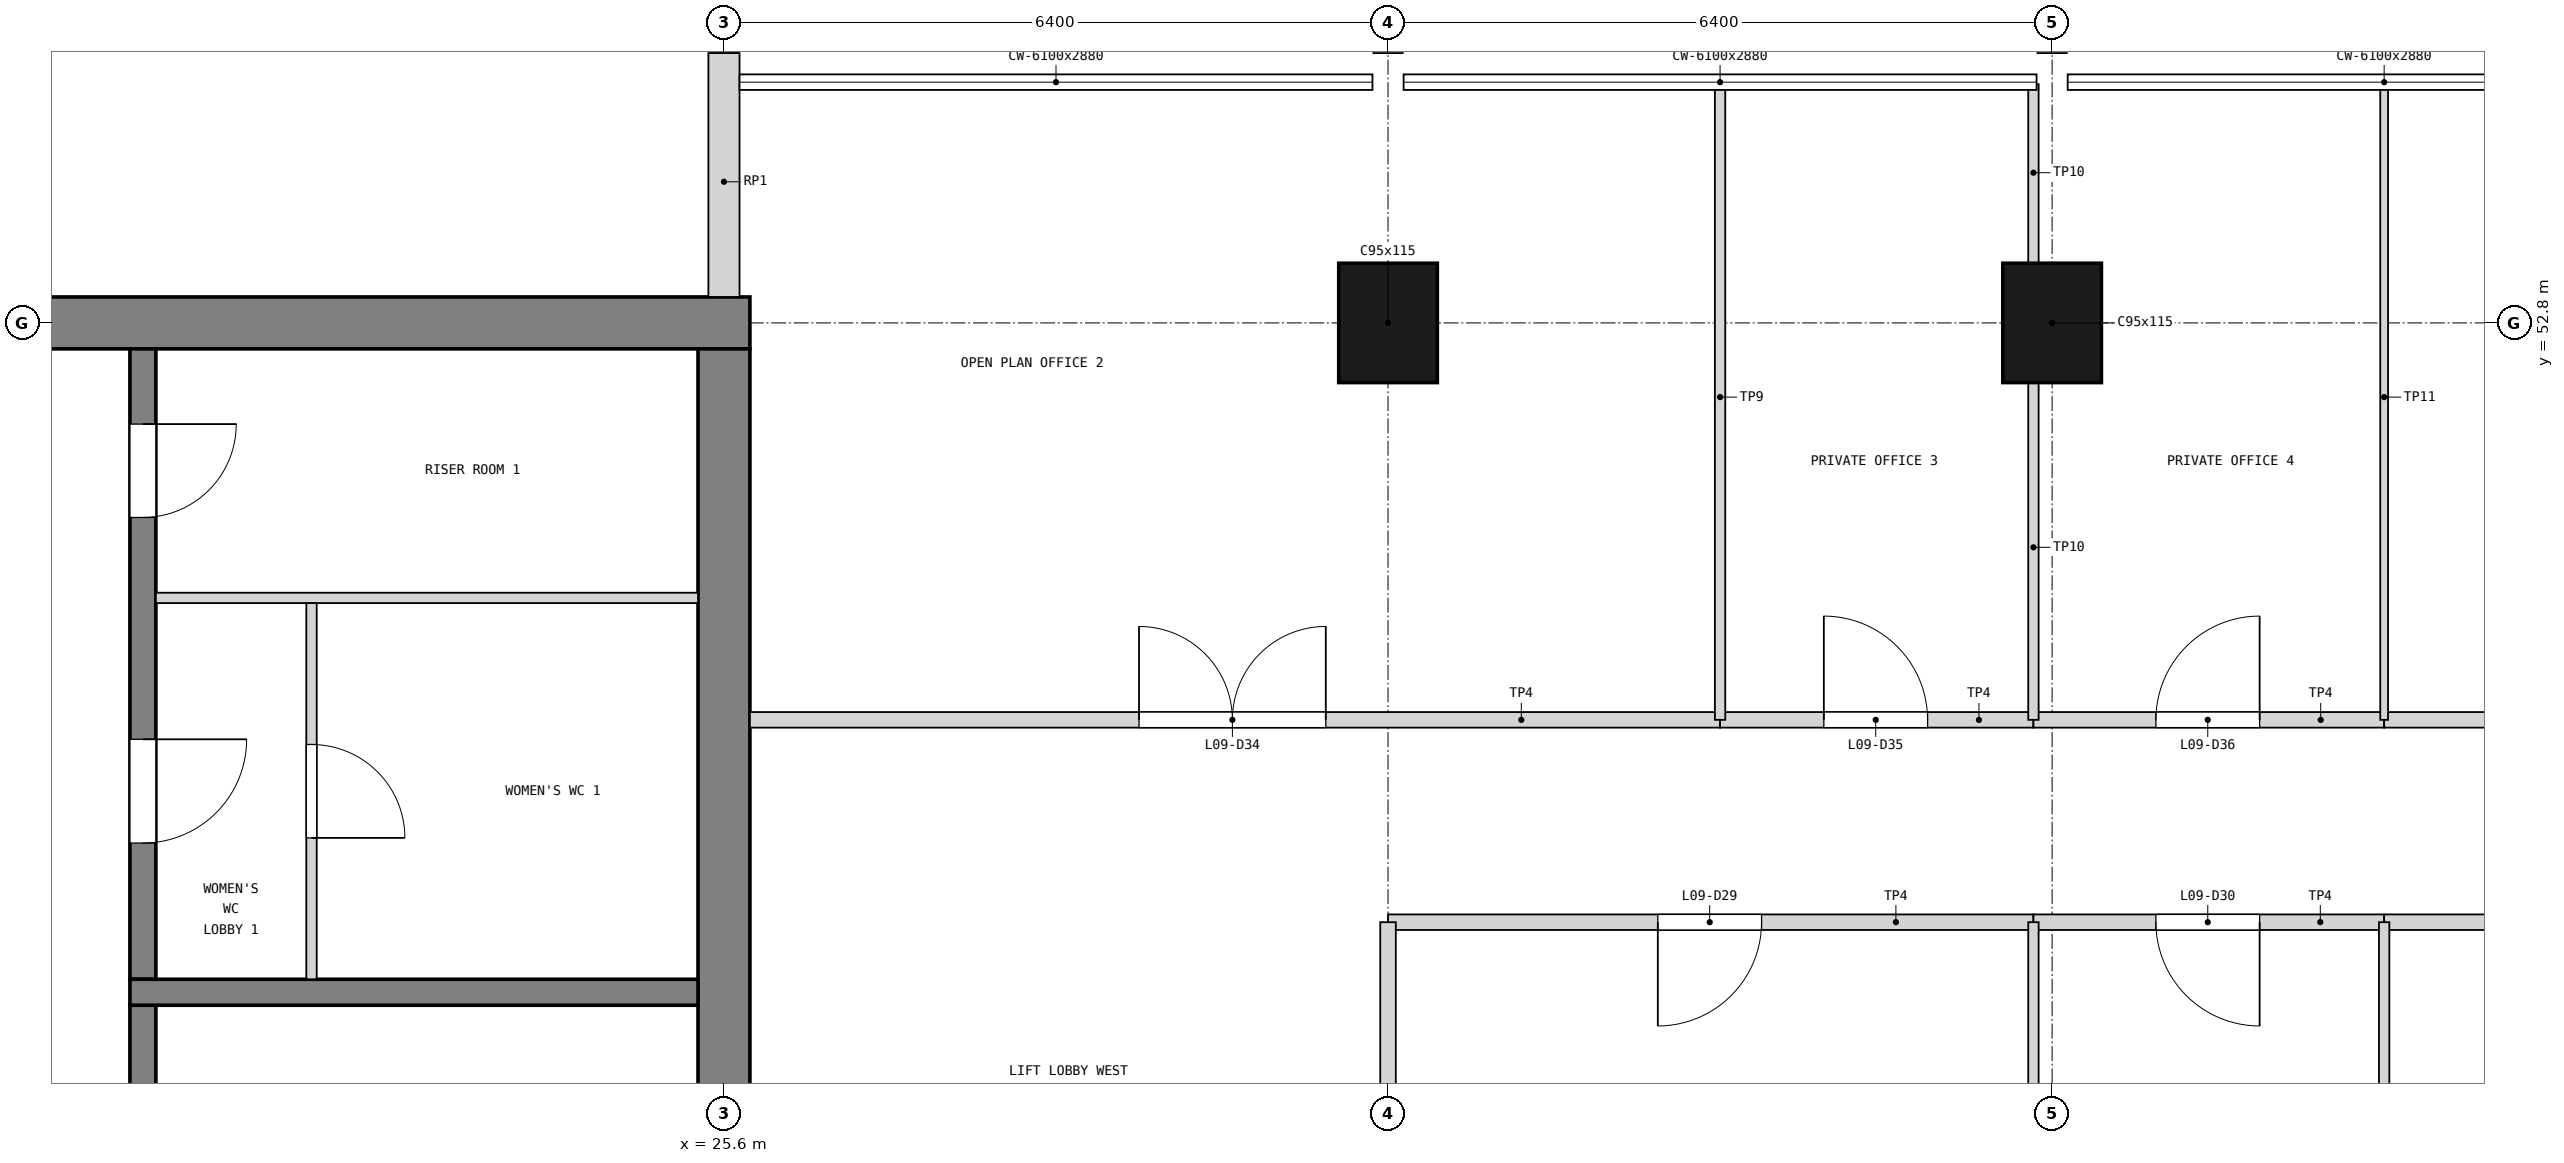
"""IFC4 building model, lengths in metres.
Left out: names, types, materials, properties, quantities, classifications, styles, units other than length and angle.
Written with IfcOpenShell. Run it as: python <this file> out.ifc"""

import sys

from ifc_helpers import new_model, si_unit, direction, frame, frame_2d, origin, origin_2d, place, context, subcontext, project, spatial, rectangle, extrude, element, fill, save


model = new_model("IFC4")
c1 = context("Model", 3, precision=1e-05, world=origin(), true_north=direction((0.0, 1.0)))
c2 = subcontext(c1, "Body", "Model", "MODEL_VIEW")
j1 = project(units=[si_unit("LENGTHUNIT", "METRE"), si_unit("PLANEANGLEUNIT", "RADIAN")], contexts=[c1])
p1 = place(None, origin())
s1 = spatial("IfcSite", under=j1, at=p1, CompositionType="ELEMENT")
p2 = place(p1, origin())
s2 = spatial("IfcBuilding", under=s1, at=p2, CompositionType="ELEMENT")
p3 = place(p2, frame((0.0, 0.0, 36.6)))
s3 = spatial("IfcBuildingStorey", under=s2, at=p3, CompositionType="ELEMENT", Elevation=36.6)
p4 = place(p3, frame((12.55, 52.8, 0.0), z_axis=(0.0, 0.0, 1.0), x_axis=(1.0, 0.0, 0.0)))
e1 = element("IfcWall", 1, at=p4, inside=s3, PredefinedType="SHEAR", context=c2, shape_type="SweptSolid", body=[
    extrude(rectangle(XDim=13.3, YDim=0.5, at=frame_2d((6.65, 0.0))), origin(), (0.0, 0.0, 1.0), 3.9),
])
p5 = place(p4, frame((1.85, 0.0, 1.0)))
e2 = element("IfcOpeningElement", 2, at=p5, cuts=e1, PredefinedType="OPENING", context=c2, shape_type="SweptSolid", body=[
    extrude(rectangle(XDim=0.4, YDim=2.0, at=frame_2d((0.2, 1.0))), frame((0.0, 0.26, 0.0), z_axis=(0.0, -1.0, 0.0), x_axis=(1.0, 0.0, 0.0)), (0.0, 0.0, 1.0), 0.52),
])
p6 = place(p3, frame((25.6, 33.85, 0.0), z_axis=(0.0, 0.0, 1.0), x_axis=(0.0, 1.0, 0.0)))
e3 = element("IfcWall", 3, at=p6, inside=s3, PredefinedType="SHEAR", context=c2, shape_type="SweptSolid", body=[
    extrude(rectangle(XDim=18.7, YDim=0.5, at=frame_2d((9.35, 0.0))), origin(), (0.0, 0.0, 1.0), 3.9),
])
p7 = place(p6, frame((8.35, 0.0, 0.0)))
e4 = element("IfcOpeningElement", 4, at=p7, cuts=e3, PredefinedType="OPENING", context=c2, shape_type="SweptSolid", body=[
    extrude(rectangle(XDim=2.0, YDim=2.1, at=frame_2d((1.0, 1.05))), frame((0.0, 0.26, 0.0), z_axis=(0.0, -1.0, 0.0), x_axis=(1.0, 0.0, 0.0)), (0.0, 0.0, 1.0), 0.52),
])
for number, where, z_axis, x_axis in (
    (5, (32.0, 52.8, 0.0), (0.0, 0.0, 1.0), (1.0, 0.0, 0.0)),
    (6, (38.4, 52.8, 0.0), (0.0, 0.0, 1.0), (1.0, 0.0, 0.0)),
):
    element("IfcColumn", number, at=place(p3, frame(where, z_axis=z_axis, x_axis=x_axis)), inside=s3, PredefinedType="COLUMN", context=c2, shape_type="SweptSolid", body=[
        extrude(rectangle(XDim=0.95, YDim=1.15, at=origin_2d()), origin(), (0.0, 0.0, 1.0), 3.9),
    ])
p8 = place(p3, frame((25.6, 53.05, 0.0), z_axis=(0.0, 0.0, 1.0), x_axis=(0.0, 1.0, 0.0)))
e7 = element("IfcWall", 7, at=p8, inside=s3, PredefinedType="SOLIDWALL", context=c2, shape_type="SweptSolid", body=[
    extrude(rectangle(XDim=2.35, YDim=0.3, at=frame_2d((1.175, 0.0))), origin(), (0.0, 0.0, 1.0), 2.88),
])
p9 = place(p3, frame((20.0, 40.175, 0.0), z_axis=(0.0, 0.0, 1.0), x_axis=(0.0, 1.0, 0.0)))
e8 = element("IfcWall", 8, at=p9, inside=s3, PredefinedType="SOLIDWALL", context=c2, shape_type="SweptSolid", body=[
    extrude(rectangle(XDim=6.05, YDim=0.25, at=frame_2d((3.025, 0.0))), origin(), (0.0, 0.0, 1.0), 3.6),
])
p10 = place(p9, frame((2.025, 0.0, 0.0)))
e9 = element("IfcOpeningElement", 9, at=p10, cuts=e8, PredefinedType="OPENING", context=c2, shape_type="SweptSolid", body=[
    extrude(rectangle(XDim=2.0, YDim=2.1, at=frame_2d((1.0, 1.05))), frame((0.0, 0.135, 0.0), z_axis=(0.0, -1.0, 0.0), x_axis=(1.0, 0.0, 0.0)), (0.0, 0.0, 1.0), 0.27),
])
p11 = place(p3, frame((20.0, 46.475, 0.0), z_axis=(0.0, 0.0, 1.0), x_axis=(0.0, 1.0, 0.0)))
e10 = element("IfcWall", 10, at=p11, inside=s3, PredefinedType="SOLIDWALL", context=c2, shape_type="SweptSolid", body=[
    extrude(rectangle(XDim=6.075, YDim=0.25, at=frame_2d((3.038, 0.0))), origin(), (0.0, 0.0, 1.0), 3.6),
])
p12 = place(p11, frame((1.312, 0.0, 0.0)))
e11 = element("IfcOpeningElement", 11, at=p12, cuts=e10, PredefinedType="OPENING", context=c2, shape_type="SweptSolid", body=[
    extrude(rectangle(XDim=1.0, YDim=2.1, at=frame_2d((0.5, 1.05))), frame((0.0, 0.135, 0.0), z_axis=(0.0, -1.0, 0.0), x_axis=(1.0, 0.0, 0.0)), (0.0, 0.0, 1.0), 0.27),
])
p13 = place(p11, frame((4.45, 0.0, 0.0)))
e12 = element("IfcOpeningElement", 12, at=p13, cuts=e10, PredefinedType="OPENING", context=c2, shape_type="SweptSolid", body=[
    extrude(rectangle(XDim=0.9, YDim=2.1, at=frame_2d((0.45, 1.05))), frame((0.0, 0.135, 0.0), z_axis=(0.0, -1.0, 0.0), x_axis=(1.0, 0.0, 0.0)), (0.0, 0.0, 1.0), 0.27),
])
p14 = place(p3, frame((19.875, 46.35, 0.0), z_axis=(0.0, 0.0, 1.0), x_axis=(1.0, 0.0, 0.0)))
e13 = element("IfcWall", 13, at=p14, inside=s3, PredefinedType="SOLIDWALL", context=c2, shape_type="SweptSolid", body=[
    extrude(rectangle(XDim=5.475, YDim=0.25, at=frame_2d((2.738, 0.0))), origin(), (0.0, 0.0, 1.0), 3.6),
])
p15 = place(p3, frame((20.125, 50.15, 0.0), z_axis=(0.0, 0.0, 1.0), x_axis=(1.0, 0.0, 0.0)))
e14 = element("IfcWall", 14, at=p15, inside=s3, PredefinedType="PARTITIONING", context=c2, shape_type="SweptSolid", body=[
    extrude(rectangle(XDim=5.225, YDim=0.1, at=frame_2d((2.613, 0.0))), origin(), (0.0, 0.0, 1.0), 3.6),
])
p16 = place(p3, frame((21.625, 46.475, 0.0), z_axis=(0.0, 0.0, 1.0), x_axis=(0.0, 1.0, 0.0)))
e15 = element("IfcWall", 15, at=p16, inside=s3, PredefinedType="PARTITIONING", context=c2, shape_type="SweptSolid", body=[
    extrude(rectangle(XDim=3.625, YDim=0.1, at=frame_2d((1.812, 0.0))), origin(), (0.0, 0.0, 1.0), 3.6),
])
p17 = place(p16, frame((1.363, 0.0, 0.0)))
e16 = element("IfcOpeningElement", 16, at=p17, cuts=e15, PredefinedType="OPENING", context=c2, shape_type="SweptSolid", body=[
    extrude(rectangle(XDim=0.9, YDim=2.1, at=frame_2d((0.45, 1.05))), frame((0.0, 0.06, 0.0), z_axis=(0.0, -1.0, 0.0), x_axis=(1.0, 0.0, 0.0)), (0.0, 0.0, 1.0), 0.12),
])
p18 = place(p3, frame((32.0, 47.025, 0.0), z_axis=(0.0, 0.0, 1.0), x_axis=(1.0, 0.0, 0.0)))
e17 = element("IfcWall", 17, at=p18, inside=s3, PredefinedType="PARTITIONING", context=c2, shape_type="SweptSolid", body=[
    extrude(rectangle(XDim=6.22, YDim=0.15, at=frame_2d((3.11, 0.0))), origin(), (0.0, 0.0, 1.0), 3.68),
])
p19 = place(p18, frame((2.6, 0.0, 0.0)))
e18 = element("IfcOpeningElement", 18, at=p19, cuts=e17, PredefinedType="OPENING", context=c2, shape_type="SweptSolid", body=[
    extrude(rectangle(XDim=1.0, YDim=2.1, at=frame_2d((0.5, 1.05))), frame((0.0, 0.085, 0.0), z_axis=(0.0, -1.0, 0.0), x_axis=(1.0, 0.0, 0.0)), (0.0, 0.0, 1.0), 0.17),
])
p20 = place(p3, frame((38.22, 47.025, 0.0), z_axis=(0.0, 0.0, 1.0), x_axis=(1.0, 0.0, 0.0)))
e19 = element("IfcWall", 19, at=p20, inside=s3, PredefinedType="PARTITIONING", context=c2, shape_type="SweptSolid", body=[
    extrude(rectangle(XDim=3.38, YDim=0.15, at=frame_2d((1.69, 0.0))), origin(), (0.0, 0.0, 1.0), 3.68),
])
p21 = place(p20, frame((1.18, 0.0, 0.0)))
e20 = element("IfcOpeningElement", 20, at=p21, cuts=e19, PredefinedType="OPENING", context=c2, shape_type="SweptSolid", body=[
    extrude(rectangle(XDim=1.0, YDim=2.1, at=frame_2d((0.5, 1.05))), frame((0.0, 0.085, 0.0), z_axis=(0.0, -1.0, 0.0), x_axis=(1.0, 0.0, 0.0)), (0.0, 0.0, 1.0), 0.17),
])
p22 = place(p3, frame((41.6, 47.025, 0.0), z_axis=(0.0, 0.0, 1.0), x_axis=(1.0, 0.0, 0.0)))
e21 = element("IfcWall", 21, at=p22, inside=s3, PredefinedType="PARTITIONING", context=c2, shape_type="SweptSolid", body=[
    extrude(rectangle(XDim=6.4, YDim=0.15, at=frame_2d((3.2, 0.0))), origin(), (0.0, 0.0, 1.0), 3.68),
])
p23 = place(p22, frame((2.3, 0.0, 0.0)))
e22 = element("IfcOpeningElement", 22, at=p23, cuts=e21, PredefinedType="OPENING", context=c2, shape_type="SweptSolid", body=[
    extrude(rectangle(XDim=1.8, YDim=2.1, at=frame_2d((0.9, 1.05))), frame((0.0, 0.085, 0.0), z_axis=(0.0, -1.0, 0.0), x_axis=(1.0, 0.0, 0.0)), (0.0, 0.0, 1.0), 0.17),
])
p24 = place(p3, frame((38.22, 43.62, 0.0), z_axis=(0.0, 0.0, 1.0), x_axis=(0.0, 1.0, 0.0)))
e23 = element("IfcWall", 23, at=p24, inside=s3, PredefinedType="PARTITIONING", context=c2, shape_type="SweptSolid", body=[
    extrude(rectangle(XDim=3.405, YDim=0.1, at=frame_2d((1.703, 0.0))), origin(), (0.0, 0.0, 1.0), 2.78),
])
p25 = place(p3, frame((41.6, 43.2, 0.0), z_axis=(0.0, 0.0, 1.0), x_axis=(0.0, 1.0, 0.0)))
e24 = element("IfcWall", 24, at=p25, inside=s3, PredefinedType="PARTITIONING", context=c2, shape_type="SweptSolid", body=[
    extrude(rectangle(XDim=3.825, YDim=0.1, at=frame_2d((1.913, 0.0))), origin(), (0.0, 0.0, 1.0), 3.08),
])
p26 = place(p3, frame((25.85, 48.975, 0.0), z_axis=(0.0, 0.0, 1.0), x_axis=(1.0, 0.0, 0.0)))
e25 = element("IfcWall", 25, at=p26, inside=s3, PredefinedType="PARTITIONING", context=c2, shape_type="SweptSolid", body=[
    extrude(rectangle(XDim=9.35, YDim=0.15, at=frame_2d((4.675, 0.0))), origin(), (0.0, 0.0, 1.0), 3.68),
])
p27 = place(p26, frame((3.75, 0.0, 0.0)))
e26 = element("IfcOpeningElement", 26, at=p27, cuts=e25, PredefinedType="OPENING", context=c2, shape_type="SweptSolid", body=[
    extrude(rectangle(XDim=1.8, YDim=2.1, at=frame_2d((0.9, 1.05))), frame((0.0, 0.085, 0.0), z_axis=(0.0, -1.0, 0.0), x_axis=(1.0, 0.0, 0.0)), (0.0, 0.0, 1.0), 0.17),
])
p28 = place(p3, frame((35.2, 48.975, 0.0), z_axis=(0.0, 0.0, 1.0), x_axis=(1.0, 0.0, 0.0)))
e27 = element("IfcWall", 27, at=p28, inside=s3, PredefinedType="PARTITIONING", context=c2, shape_type="SweptSolid", body=[
    extrude(rectangle(XDim=3.02, YDim=0.15, at=frame_2d((1.51, 0.0))), origin(), (0.0, 0.0, 1.0), 3.68),
])
p29 = place(p28, frame((1.0, 0.0, 0.0)))
e28 = element("IfcOpeningElement", 28, at=p29, cuts=e27, PredefinedType="OPENING", context=c2, shape_type="SweptSolid", body=[
    extrude(rectangle(XDim=1.0, YDim=2.1, at=frame_2d((0.5, 1.05))), frame((0.0, 0.085, 0.0), z_axis=(0.0, -1.0, 0.0), x_axis=(1.0, 0.0, 0.0)), (0.0, 0.0, 1.0), 0.17),
])
p30 = place(p3, frame((38.22, 48.975, 0.0), z_axis=(0.0, 0.0, 1.0), x_axis=(1.0, 0.0, 0.0)))
e29 = element("IfcWall", 29, at=p30, inside=s3, PredefinedType="PARTITIONING", context=c2, shape_type="SweptSolid", body=[
    extrude(rectangle(XDim=3.38, YDim=0.15, at=frame_2d((1.69, 0.0))), origin(), (0.0, 0.0, 1.0), 3.68),
])
p31 = place(p30, frame((1.18, 0.0, 0.0)))
e30 = element("IfcOpeningElement", 30, at=p31, cuts=e29, PredefinedType="OPENING", context=c2, shape_type="SweptSolid", body=[
    extrude(rectangle(XDim=1.0, YDim=2.1, at=frame_2d((0.5, 1.05))), frame((0.0, 0.085, 0.0), z_axis=(0.0, -1.0, 0.0), x_axis=(1.0, 0.0, 0.0)), (0.0, 0.0, 1.0), 0.17),
])
p32 = place(p3, frame((41.6, 48.975, 0.0), z_axis=(0.0, 0.0, 1.0), x_axis=(1.0, 0.0, 0.0)))
e31 = element("IfcWall", 31, at=p32, inside=s3, PredefinedType="PARTITIONING", context=c2, shape_type="SweptSolid", body=[
    extrude(rectangle(XDim=6.4, YDim=0.15, at=frame_2d((3.2, 0.0))), origin(), (0.0, 0.0, 1.0), 3.68),
])
p33 = place(p32, frame((2.7, 0.0, 0.0)))
e32 = element("IfcOpeningElement", 32, at=p33, cuts=e31, PredefinedType="OPENING", context=c2, shape_type="SweptSolid", body=[
    extrude(rectangle(XDim=1.0, YDim=2.1, at=frame_2d((0.5, 1.05))), frame((0.0, 0.085, 0.0), z_axis=(0.0, -1.0, 0.0), x_axis=(1.0, 0.0, 0.0)), (0.0, 0.0, 1.0), 0.17),
])
p34 = place(p3, frame((35.2, 48.975, 0.0), z_axis=(0.0, 0.0, 1.0), x_axis=(0.0, 1.0, 0.0)))
e33 = element("IfcWall", 33, at=p34, inside=s3, PredefinedType="PARTITIONING", context=c2, shape_type="SweptSolid", body=[
    extrude(rectangle(XDim=6.125, YDim=0.1, at=frame_2d((3.062, 0.0))), origin(), (0.0, 0.0, 1.0), 3.08),
])
p35 = place(p3, frame((38.22, 48.975, 0.0), z_axis=(0.0, 0.0, 1.0), x_axis=(0.0, 1.0, 0.0)))
e34 = element("IfcWall", 34, at=p35, inside=s3, PredefinedType="PARTITIONING", context=c2, shape_type="SweptSolid", body=[
    extrude(rectangle(XDim=3.27, YDim=0.1, at=frame_2d((1.635, 0.0))), origin(), (0.0, 0.0, 1.0), 2.78),
])
p36 = place(p3, frame((38.22, 53.355, 0.0), z_axis=(0.0, 0.0, 1.0), x_axis=(0.0, 1.0, 0.0)))
e35 = element("IfcWall", 35, at=p36, inside=s3, PredefinedType="PARTITIONING", context=c2, shape_type="SweptSolid", body=[
    extrude(rectangle(XDim=1.745, YDim=0.1, at=frame_2d((0.873, 0.0))), origin(), (0.0, 0.0, 1.0), 2.78),
])
p37 = place(p3, frame((41.6, 48.975, 0.0), z_axis=(0.0, 0.0, 1.0), x_axis=(0.0, 1.0, 0.0)))
e36 = element("IfcWall", 36, at=p37, inside=s3, PredefinedType="PARTITIONING", context=c2, shape_type="SweptSolid", body=[
    extrude(rectangle(XDim=6.125, YDim=0.075, at=frame_2d((3.062, 0.0))), origin(), (0.0, 0.0, 1.0), 3.08),
])
p38 = place(p3, frame((32.0, 33.6, 0.0), z_axis=(0.0, 0.0, 1.0), x_axis=(0.0, 1.0, 0.0)))
e37 = element("IfcWall", 37, at=p38, inside=s3, PredefinedType="PARTITIONING", context=c2, shape_type="SweptSolid", body=[
    extrude(rectangle(XDim=13.425, YDim=0.15, at=frame_2d((6.712, 0.0))), origin(), (0.0, 0.0, 1.0), 2.78),
])
p39 = place(p12, frame((1.0, 0.0, 0.0), z_axis=(0.0, 0.0, 1.0), x_axis=(-1.0, 0.0, 0.0)))
e38 = element("IfcDoor", 38, at=p39, inside=s3, OperationType="SINGLE_SWING_LEFT", PredefinedType="DOOR", context=c2, shape_type="SweptSolid", body=[
    extrude(rectangle(XDim=1.0, YDim=2.1, at=frame_2d((0.5, 1.05))), frame((0.0, 0.025, 0.0), z_axis=(0.0, -1.0, 0.0), x_axis=(1.0, 0.0, 0.0)), (0.0, 0.0, 1.0), 0.05),
])
fill(e11, e38)
p40 = place(p17, frame((0.9, 0.0, 0.0), z_axis=(0.0, 0.0, 1.0), x_axis=(-1.0, 0.0, 0.0)))
e39 = element("IfcDoor", 39, at=p40, inside=s3, OperationType="SINGLE_SWING_RIGHT", PredefinedType="DOOR", context=c2, shape_type="SweptSolid", body=[
    extrude(rectangle(XDim=0.9, YDim=2.1, at=frame_2d((0.45, 1.05))), frame((0.0, 0.025, 0.0), z_axis=(0.0, -1.0, 0.0), x_axis=(1.0, 0.0, 0.0)), (0.0, 0.0, 1.0), 0.05),
])
fill(e16, e39)
p41 = place(p13, frame((0.9, 0.0, 0.0), z_axis=(0.0, 0.0, 1.0), x_axis=(-1.0, 0.0, 0.0)))
e40 = element("IfcDoor", 40, at=p41, inside=s3, OperationType="SINGLE_SWING_LEFT", PredefinedType="DOOR", context=c2, shape_type="SweptSolid", body=[
    extrude(rectangle(XDim=0.9, YDim=2.1, at=frame_2d((0.45, 1.05))), frame((0.0, 0.025, 0.0), z_axis=(0.0, -1.0, 0.0), x_axis=(1.0, 0.0, 0.0)), (0.0, 0.0, 1.0), 0.05),
])
fill(e12, e40)
p42 = place(p19, frame((1.0, 0.0, 0.0), z_axis=(0.0, 0.0, 1.0), x_axis=(-1.0, 0.0, 0.0)))
e41 = element("IfcDoor", 41, at=p42, inside=s3, OperationType="SINGLE_SWING_RIGHT", PredefinedType="DOOR", context=c2, shape_type="SweptSolid", body=[
    extrude(rectangle(XDim=1.0, YDim=2.1, at=frame_2d((0.5, 1.05))), frame((0.0, 0.025, 0.0), z_axis=(0.0, -1.0, 0.0), x_axis=(1.0, 0.0, 0.0)), (0.0, 0.0, 1.0), 0.05),
])
fill(e18, e41)
p43 = place(p21, frame((1.0, 0.0, 0.0), z_axis=(0.0, 0.0, 1.0), x_axis=(-1.0, 0.0, 0.0)))
e42 = element("IfcDoor", 42, at=p43, inside=s3, OperationType="SINGLE_SWING_LEFT", PredefinedType="DOOR", context=c2, shape_type="SweptSolid", body=[
    extrude(rectangle(XDim=1.0, YDim=2.1, at=frame_2d((0.5, 1.05))), frame((0.0, 0.025, 0.0), z_axis=(0.0, -1.0, 0.0), x_axis=(1.0, 0.0, 0.0)), (0.0, 0.0, 1.0), 0.05),
])
fill(e20, e42)
p44 = place(p27, origin())
e43 = element("IfcDoor", 43, at=p44, inside=s3, OperationType="DOUBLE_DOOR_SINGLE_SWING", PredefinedType="DOOR", context=c2, shape_type="SweptSolid", body=[
    extrude(rectangle(XDim=1.8, YDim=2.1, at=frame_2d((0.9, 1.05))), frame((0.0, 0.025, 0.0), z_axis=(0.0, -1.0, 0.0), x_axis=(1.0, 0.0, 0.0)), (0.0, 0.0, 1.0), 0.05),
])
fill(e26, e43)
p45 = place(p29, origin())
e44 = element("IfcDoor", 44, at=p45, inside=s3, OperationType="SINGLE_SWING_LEFT", PredefinedType="DOOR", context=c2, shape_type="SweptSolid", body=[
    extrude(rectangle(XDim=1.0, YDim=2.1, at=frame_2d((0.5, 1.05))), frame((0.0, 0.025, 0.0), z_axis=(0.0, -1.0, 0.0), x_axis=(1.0, 0.0, 0.0)), (0.0, 0.0, 1.0), 0.05),
])
fill(e28, e44)
p46 = place(p31, origin())
e45 = element("IfcDoor", 45, at=p46, inside=s3, OperationType="SINGLE_SWING_RIGHT", PredefinedType="DOOR", context=c2, shape_type="SweptSolid", body=[
    extrude(rectangle(XDim=1.0, YDim=2.1, at=frame_2d((0.5, 1.05))), frame((0.0, 0.025, 0.0), z_axis=(0.0, -1.0, 0.0), x_axis=(1.0, 0.0, 0.0)), (0.0, 0.0, 1.0), 0.05),
])
fill(e30, e45)
save(model, sys.argv[1])
